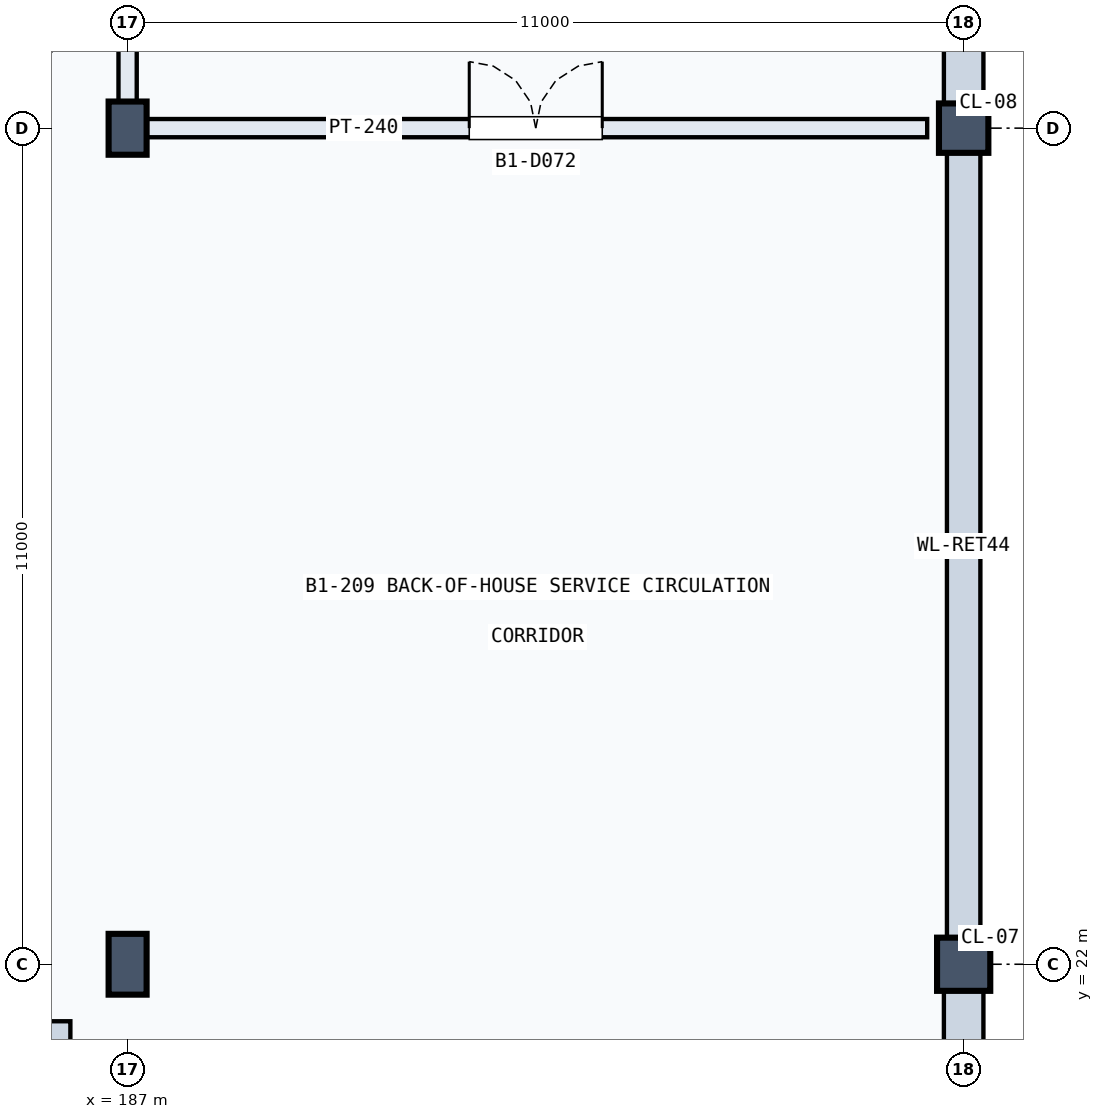
"""IFC4 building model, lengths in metres.
Left out: names, types, materials, properties, quantities, classifications, styles, units other than length and angle.
Written with IfcOpenShell. Run it as: python <this file> out.ifc"""

import sys

from ifc_helpers import new_model, si_unit, direction, frame, frame_2d, origin, origin_2d, place, context, subcontext, project, spatial, rectangle, extrude, element, fill, save


model = new_model("IFC4")
c1 = context("Model", 3, precision=1e-05, world=origin(), true_north=direction((0.0, 1.0)))
c2 = subcontext(c1, "Body", "Model", "MODEL_VIEW")
j1 = project(units=[si_unit("LENGTHUNIT", "METRE"), si_unit("PLANEANGLEUNIT", "RADIAN")], contexts=[c1])
p1 = place(None, origin())
s1 = spatial("IfcSite", under=j1, at=p1, CompositionType="ELEMENT")
p2 = place(p1, origin())
s2 = spatial("IfcBuilding", under=s1, at=p2, CompositionType="ELEMENT")
p3 = place(p2, frame((0.0, 0.0, -5.4)))
s3 = spatial("IfcBuildingStorey", under=s2, at=p3, CompositionType="ELEMENT", Elevation=-5.4)
p4 = place(p3, frame((187.0, 22.0, 0.0), z_axis=(0.0, 0.0, 1.0), x_axis=(1.0, 0.0, 0.0)))
e1 = element("IfcColumn", 1, at=p4, inside=s3, PredefinedType="COLUMN", context=c2, shape_type="SweptSolid", body=[
    extrude(rectangle(XDim=0.5, YDim=0.8, at=origin_2d()), origin(), (0.0, 0.0, 1.0), 5.4),
])
p5 = place(p3, frame((187.0, 33.0, 0.0), z_axis=(0.0, 0.0, 1.0), x_axis=(1.0, 0.0, 0.0)))
e2 = element("IfcColumn", 2, at=p5, inside=s3, PredefinedType="COLUMN", context=c2, shape_type="SweptSolid", body=[
    extrude(rectangle(XDim=0.5, YDim=0.7, at=origin_2d()), origin(), (0.0, 0.0, 1.0), 5.4),
])
p6 = place(p3, frame((198.0, 22.0, 0.0), z_axis=(0.0, 0.0, 1.0), x_axis=(1.0, 0.0, 0.0)))
e3 = element("IfcColumn", 3, at=p6, inside=s3, PredefinedType="COLUMN", context=c2, shape_type="SweptSolid", body=[
    extrude(rectangle(XDim=0.7, YDim=0.7, at=origin_2d()), origin(), (0.0, 0.0, 1.0), 5.4),
])
p7 = place(p3, frame((198.0, 33.0, 0.0), z_axis=(0.0, 0.0, 1.0), x_axis=(1.0, 0.0, 0.0)))
e4 = element("IfcColumn", 4, at=p7, inside=s3, PredefinedType="COLUMN", context=c2, shape_type="SweptSolid", body=[
    extrude(rectangle(XDim=0.65, YDim=0.65, at=origin_2d()), origin(), (0.0, 0.0, 1.0), 5.4),
])
p8 = place(p3, frame((198.0, 11.22, 0.0), z_axis=(0.0, 0.0, 1.0), x_axis=(0.0, 1.0, 0.0)))
e5 = element("IfcWall", 5, at=p8, inside=s3, PredefinedType="SOLIDWALL", context=c2, shape_type="SweptSolid", body=[
    extrude(rectangle(XDim=10.56, YDim=0.52, at=frame_2d((5.28, 0.0))), origin(), (0.0, 0.0, 1.0), 4.346),
])
p9 = place(p3, frame((198.0, 22.22, 0.0), z_axis=(0.0, 0.0, 1.0), x_axis=(0.0, 1.0, 0.0)))
e6 = element("IfcWall", 6, at=p9, inside=s3, PredefinedType="SOLIDWALL", context=c2, shape_type="SweptSolid", body=[
    extrude(rectangle(XDim=10.56, YDim=0.44, at=frame_2d((5.28, 0.0))), origin(), (0.0, 0.0, 1.0), 4.418),
])
p10 = place(p3, frame((198.0, 33.22, 0.0), z_axis=(0.0, 0.0, 1.0), x_axis=(0.0, 1.0, 0.0)))
e7 = element("IfcWall", 7, at=p10, inside=s3, PredefinedType="SOLIDWALL", context=c2, shape_type="SweptSolid", body=[
    extrude(rectangle(XDim=10.56, YDim=0.52, at=frame_2d((5.28, 0.0))), origin(), (0.0, 0.0, 1.0), 4.13),
])
p11 = place(p3, frame((186.072, 17.45, 0.0), z_axis=(0.0, 0.0, 1.0), x_axis=(0.0, 1.0, 0.0)))
e8 = element("IfcWall", 8, at=p11, inside=s3, PredefinedType="SOLIDWALL", context=c2, shape_type="SweptSolid", body=[
    extrude(rectangle(XDim=3.8, YDim=0.35, at=frame_2d((1.9, 0.0))), origin(), (0.0, 0.0, 1.0), 5.04),
])
p12 = place(p3, frame((187.22, 33.0, 0.0), z_axis=(0.0, 0.0, 1.0), x_axis=(1.0, 0.0, 0.0)))
e9 = element("IfcWall", 9, at=p12, inside=s3, PredefinedType="PARTITIONING", context=c2, shape_type="SweptSolid", body=[
    extrude(rectangle(XDim=10.3, YDim=0.24, at=frame_2d((5.15, 0.0))), origin(), (0.0, 0.0, 1.0), 4.23),
])
p13 = place(p12, frame((4.275, 0.0, 0.0)))
e10 = element("IfcOpeningElement", 10, at=p13, cuts=e9, PredefinedType="OPENING", context=c2, shape_type="SweptSolid", body=[
    extrude(rectangle(XDim=1.75, YDim=2.25, at=frame_2d((0.875, 1.125))), frame((0.0, 0.13, 0.0), z_axis=(0.0, -1.0, 0.0), x_axis=(1.0, 0.0, 0.0)), (0.0, 0.0, 1.0), 0.26),
])
p14 = place(p3, frame((187.0, 33.22, 0.0), z_axis=(0.0, 0.0, 1.0), x_axis=(0.0, 1.0, 0.0)))
e11 = element("IfcWall", 11, at=p14, inside=s3, PredefinedType="PARTITIONING", context=c2, shape_type="SweptSolid", body=[
    extrude(rectangle(XDim=10.56, YDim=0.24, at=frame_2d((5.28, 0.0))), origin(), (0.0, 0.0, 1.0), 4.13),
])
p15 = place(p13, origin())
e12 = element("IfcDoor", 12, at=p15, inside=s3, OperationType="DOUBLE_DOOR_SINGLE_SWING", PredefinedType="DOOR", context=c2, shape_type="SweptSolid", body=[
    extrude(rectangle(XDim=1.75, YDim=2.25, at=frame_2d((0.875, 1.125))), frame((0.0, 0.025, 0.0), z_axis=(0.0, -1.0, 0.0), x_axis=(1.0, 0.0, 0.0)), (0.0, 0.0, 1.0), 0.05),
])
fill(e10, e12)
save(model, sys.argv[1])
